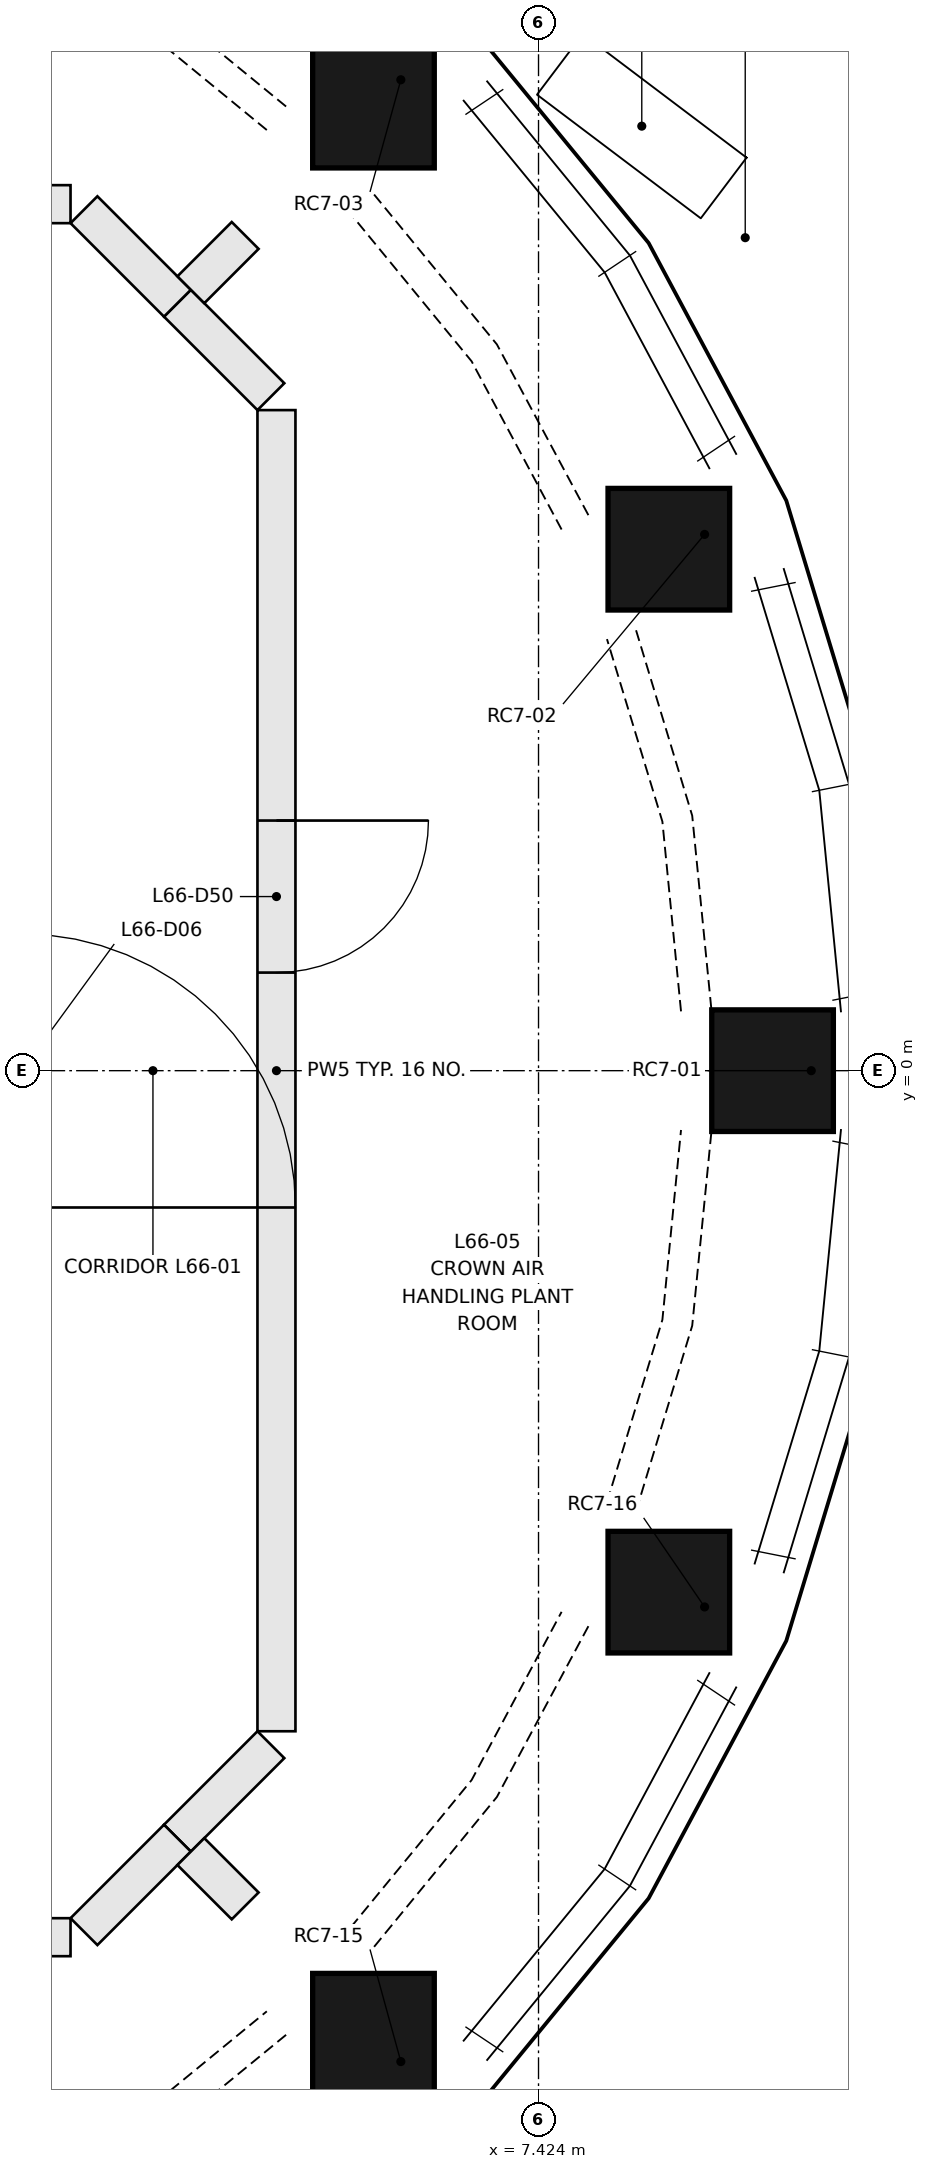
"""IFC4 building model, lengths in metres.
Left out: names, types, materials, properties, quantities, classifications, styles, units other than length and angle.
Written with IfcOpenShell. Run it as: python <this file> out.ifc"""

import sys

from ifc_helpers import new_model, si_unit, direction, frame, frame_2d, origin, origin_2d, place, context, subcontext, project, spatial, rectangle, extrude, element, fill, save


model = new_model("IFC4")
c1 = context("Model", 3, precision=1e-05, world=origin(), true_north=direction((0.0, 1.0)))
c2 = subcontext(c1, "Body", "Model", "MODEL_VIEW")
j1 = project(units=[si_unit("LENGTHUNIT", "METRE"), si_unit("PLANEANGLEUNIT", "RADIAN")], contexts=[c1])
p1 = place(None, origin())
s1 = spatial("IfcSite", under=j1, at=p1, CompositionType="ELEMENT")
p2 = place(p1, origin())
s2 = spatial("IfcBuilding", under=s1, at=p2, CompositionType="ELEMENT")
p3 = place(p2, frame((0.0, 0.0, 244.4)))
s3 = spatial("IfcBuildingStorey", under=s2, at=p3, CompositionType="ELEMENT", Elevation=244.4)
p4 = place(p3, frame((9.218, 0.0, 0.5), z_axis=(0.0, 0.0, 1.0), x_axis=(0.0, -1.0, 0.0)))
e1 = element("IfcColumn", 1, at=p4, inside=s3, PredefinedType="COLUMN", context=c2, shape_type="SweptSolid", body=[
    extrude(rectangle(XDim=0.8, YDim=0.8, at=origin_2d()), origin(), (0.0, -0.342, 0.94), 2.979),
])
p5 = place(p3, frame((8.517, 3.528, 0.5), z_axis=(0.0, 0.0, 1.0), x_axis=(0.38269062517, -0.923876553121, 0.0)))
e2 = element("IfcColumn", 2, at=p5, inside=s3, PredefinedType="COLUMN", context=c2, shape_type="SweptSolid", body=[
    extrude(rectangle(XDim=0.8, YDim=0.8, at=origin_2d()), origin(), (0.0, -0.342, 0.94), 2.979),
])
for number, where, z_axis, x_axis in (
    (3, (6.518, 6.518, 0.5), (0.0, 0.0, 1.0), (0.707, -0.707, 0.0)),
    (4, (6.518, -6.518, 0.5), (0.0, 0.0, 1.0), (-0.707, -0.707, 0.0)),
):
    element("IfcColumn", number, at=place(p3, frame(where, z_axis=z_axis, x_axis=x_axis)), inside=s3, PredefinedType="COLUMN", context=c2, shape_type="SweptSolid", body=[
        extrude(rectangle(XDim=0.8, YDim=0.8, at=origin_2d()), origin(), (0.0, -0.342, 0.94), 2.979),
    ])
p6 = place(p3, frame((8.517, -3.528, 0.5), z_axis=(0.0, 0.0, 1.0), x_axis=(-0.38269062517, -0.923876553121, 0.0)))
e5 = element("IfcColumn", 5, at=p6, inside=s3, PredefinedType="COLUMN", context=c2, shape_type="SweptSolid", body=[
    extrude(rectangle(XDim=0.8, YDim=0.8, at=origin_2d()), origin(), (0.0, -0.342, 0.94), 2.979),
])
for number, where, z_axis, x_axis in (
    (6, (5.049, 5.049, 0.0), (0.0, 0.0, 1.0), (0.707, -0.707, 0.0)),
    (7, (5.663, -4.434, 0.0), (0.0, 0.0, 1.0), (-0.707, -0.707, 0.0)),
):
    element("IfcWall", number, at=place(p3, frame(where, z_axis=z_axis, x_axis=x_axis)), inside=s3, PredefinedType="PARTITIONING", context=c2, shape_type="SweptSolid", body=[
        extrude(rectangle(XDim=0.87, YDim=0.25, at=frame_2d((0.435, 0.0))), origin(), (0.0, 0.0, 1.0), 2.95),
    ])
p7 = place(p3, frame((5.7, 4.345, 0.0), z_axis=(0.0, 0.0, 1.0), x_axis=(0.0, -1.0, 0.0)))
e8 = element("IfcWall", 8, at=p7, inside=s3, PredefinedType="PARTITIONING", context=c2, shape_type="SweptSolid", body=[
    extrude(rectangle(XDim=8.69, YDim=0.25, at=frame_2d((4.345, 0.0))), origin(), (0.0, 0.0, 1.0), 2.95),
])
p8 = place(p7, frame((2.7, 0.0, 0.0)))
e9 = element("IfcOpeningElement", 9, at=p8, cuts=e8, PredefinedType="OPENING", context=c2, shape_type="SweptSolid", body=[
    extrude(rectangle(XDim=1.0, YDim=2.1, at=frame_2d((0.5, 1.05))), frame((0.0, 0.135, 0.0), z_axis=(0.0, -1.0, 0.0), x_axis=(1.0, 0.0, 0.0)), (0.0, 0.0, 1.0), 0.27),
])
p9 = place(p3, frame((-4.345, 5.7, 0.0), z_axis=(0.0, 0.0, 1.0), x_axis=(1.0, 0.0, 0.0)))
e10 = element("IfcWall", 10, at=p9, inside=s3, PredefinedType="PARTITIONING", context=c2, shape_type="SweptSolid", body=[
    extrude(rectangle(XDim=8.69, YDim=0.25, at=frame_2d((4.345, 0.0))), origin(), (0.0, 0.0, 1.0), 2.95),
])
p10 = place(p9, frame((2.7, 0.0, 0.0)))
e11 = element("IfcOpeningElement", 11, at=p10, cuts=e10, PredefinedType="OPENING", context=c2, shape_type="SweptSolid", body=[
    extrude(rectangle(XDim=1.0, YDim=2.1, at=frame_2d((0.5, 1.05))), frame((0.0, 0.135, 0.0), z_axis=(0.0, -1.0, 0.0), x_axis=(1.0, 0.0, 0.0)), (0.0, 0.0, 1.0), 0.27),
])
p11 = place(p3, frame((4.434, 5.663, 0.0), z_axis=(0.0, 0.0, 1.0), x_axis=(0.707247149774, -0.706966384729, 0.0)))
e12 = element("IfcWall", 12, at=p11, inside=s3, PredefinedType="PARTITIONING", context=c2, shape_type="SweptSolid", body=[
    extrude(rectangle(XDim=0.87, YDim=0.25, at=frame_2d((0.435, 0.0))), origin(), (0.0, 0.0, 1.0), 2.95),
])
p12 = place(p3, frame((4.345, -5.7, 0.0), z_axis=(0.0, 0.0, 1.0), x_axis=(-1.0, 0.0, 0.0)))
e13 = element("IfcWall", 13, at=p12, inside=s3, PredefinedType="PARTITIONING", context=c2, shape_type="SweptSolid", body=[
    extrude(rectangle(XDim=8.69, YDim=0.25, at=frame_2d((4.345, 0.0))), origin(), (0.0, 0.0, 1.0), 2.95),
])
p13 = place(p12, frame((2.7, 0.0, 0.0)))
e14 = element("IfcOpeningElement", 14, at=p13, cuts=e13, PredefinedType="OPENING", context=c2, shape_type="SweptSolid", body=[
    extrude(rectangle(XDim=1.0, YDim=2.1, at=frame_2d((0.5, 1.05))), frame((0.0, 0.135, 0.0), z_axis=(0.0, -1.0, 0.0), x_axis=(1.0, 0.0, 0.0)), (0.0, 0.0, 1.0), 0.27),
])
p14 = place(p3, frame((5.049, -5.049, 0.0), z_axis=(0.0, 0.0, 1.0), x_axis=(-0.707247149774, -0.706966384729, 0.0)))
e15 = element("IfcWall", 15, at=p14, inside=s3, PredefinedType="PARTITIONING", context=c2, shape_type="SweptSolid", body=[
    extrude(rectangle(XDim=0.87, YDim=0.25, at=frame_2d((0.435, 0.0))), origin(), (0.0, 0.0, 1.0), 2.95),
])
for number, where, z_axis, x_axis in (
    (16, (5.137, 5.137, 0.0), (0.0, 0.0, 1.0), (0.707, 0.707, 0.0)),
    (17, (5.494, -5.494, 0.0), (0.0, 0.0, 1.0), (-0.707, 0.707, 0.0)),
):
    element("IfcWall", number, at=place(p3, frame(where, z_axis=z_axis, x_axis=x_axis)), inside=s3, PredefinedType="PARTITIONING", context=c2, shape_type="SweptSolid", body=[
        extrude(rectangle(XDim=0.505, YDim=0.25, at=frame_2d((0.252, 0.0))), origin(), (0.0, 0.0, 1.0), 2.95),
    ])
p15 = place(p8, origin())
e18 = element("IfcDoor", 18, at=p15, inside=s3, OperationType="SINGLE_SWING_LEFT", PredefinedType="DOOR", context=c2, shape_type="SweptSolid", body=[
    extrude(rectangle(XDim=1.0, YDim=2.1, at=frame_2d((0.5, 1.05))), frame((0.0, 0.025, 0.0), z_axis=(0.0, -1.0, 0.0), x_axis=(1.0, 0.0, 0.0)), (0.0, 0.0, 1.0), 0.05),
])
fill(e9, e18)
save(model, sys.argv[1])
